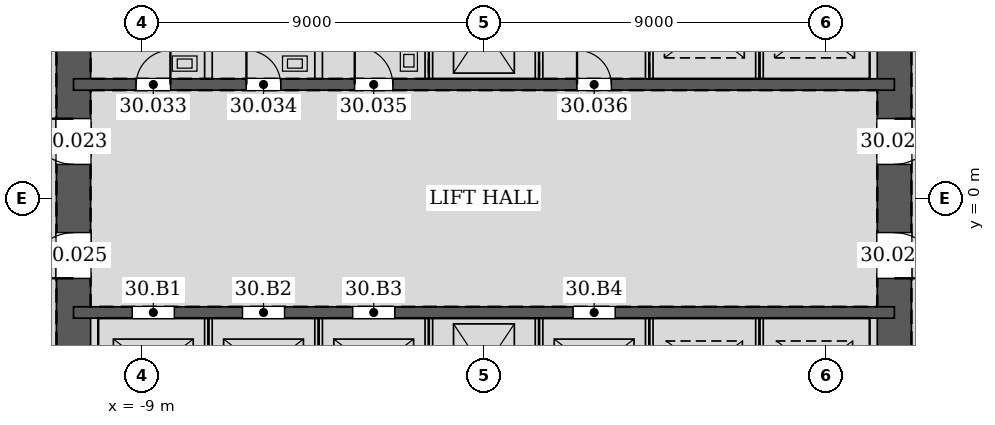
"""IFC4 building model, lengths in metres.
Left out: names, types, materials, properties, quantities, classifications, styles, units other than length and angle.
Written with IfcOpenShell. Run it as: python <this file> out.ifc"""

import sys

from ifc_helpers import new_model, si_unit, direction, frame, frame_2d, origin, place, context, subcontext, project, spatial, rectangle, extrude, element, fill, save


model = new_model("IFC4")
c1 = context("Model", 3, precision=1e-05, world=origin(), true_north=direction((0.0, 1.0)))
c2 = subcontext(c1, "Body", "Model", "MODEL_VIEW")
j1 = project(units=[si_unit("LENGTHUNIT", "METRE"), si_unit("PLANEANGLEUNIT", "RADIAN")], contexts=[c1])
p1 = place(None, origin())
s1 = spatial("IfcSite", under=j1, at=p1, CompositionType="ELEMENT")
p2 = place(p1, origin())
s2 = spatial("IfcBuilding", under=s1, at=p2, CompositionType="ELEMENT")
p3 = place(p2, frame((0.0, 0.0, 134.4)))
s3 = spatial("IfcBuildingStorey", under=s2, at=p3, CompositionType="ELEMENT", Elevation=134.4)
p4 = place(p3, frame((10.8, -10.8, 0.0), z_axis=(0.0, 0.0, 1.0), x_axis=(0.0, 1.0, 0.0)))
e1 = element("IfcWall", 1, at=p4, inside=s3, PredefinedType="SOLIDWALL", context=c2, shape_type="SweptSolid", body=[
    extrude(rectangle(XDim=21.6, YDim=0.9, at=frame_2d((10.8, 0.0))), origin(), (0.0, 0.0, 1.0), 4.2),
])
p5 = place(p4, frame((11.7, 0.0, 0.0)))
e2 = element("IfcOpeningElement", 2, at=p5, cuts=e1, PredefinedType="OPENING", context=c2, shape_type="SweptSolid", body=[
    extrude(rectangle(XDim=1.2, YDim=2.1, at=frame_2d((0.6, 1.05))), frame((0.0, 0.46, 0.0), z_axis=(0.0, -1.0, 0.0), x_axis=(1.0, 0.0, 0.0)), (0.0, 0.0, 1.0), 0.92),
])
p6 = place(p4, frame((8.7, 0.0, 0.0)))
e3 = element("IfcOpeningElement", 3, at=p6, cuts=e1, PredefinedType="OPENING", context=c2, shape_type="SweptSolid", body=[
    extrude(rectangle(XDim=1.2, YDim=2.1, at=frame_2d((0.6, 1.05))), frame((0.0, 0.46, 0.0), z_axis=(0.0, -1.0, 0.0), x_axis=(1.0, 0.0, 0.0)), (0.0, 0.0, 1.0), 0.92),
])
p7 = place(p3, frame((-10.8, 10.8, 0.0), z_axis=(0.0, 0.0, 1.0), x_axis=(0.0, -1.0, 0.0)))
e4 = element("IfcWall", 4, at=p7, inside=s3, PredefinedType="SOLIDWALL", context=c2, shape_type="SweptSolid", body=[
    extrude(rectangle(XDim=21.6, YDim=0.9, at=frame_2d((10.8, 0.0))), origin(), (0.0, 0.0, 1.0), 4.2),
])
p8 = place(p7, frame((8.7, 0.0, 0.0)))
e5 = element("IfcOpeningElement", 5, at=p8, cuts=e4, PredefinedType="OPENING", context=c2, shape_type="SweptSolid", body=[
    extrude(rectangle(XDim=1.2, YDim=2.1, at=frame_2d((0.6, 1.05))), frame((0.0, 0.46, 0.0), z_axis=(0.0, -1.0, 0.0), x_axis=(1.0, 0.0, 0.0)), (0.0, 0.0, 1.0), 0.92),
])
p9 = place(p7, frame((11.7, 0.0, 0.0)))
e6 = element("IfcOpeningElement", 6, at=p9, cuts=e4, PredefinedType="OPENING", context=c2, shape_type="SweptSolid", body=[
    extrude(rectangle(XDim=1.2, YDim=2.1, at=frame_2d((0.6, 1.05))), frame((0.0, 0.46, 0.0), z_axis=(0.0, -1.0, 0.0), x_axis=(1.0, 0.0, 0.0)), (0.0, 0.0, 1.0), 0.92),
])
p10 = place(p3, frame((-10.8, 3.0, 0.0), z_axis=(0.0, 0.0, 1.0), x_axis=(1.0, 0.0, 0.0)))
e7 = element("IfcWall", 7, at=p10, inside=s3, PredefinedType="SOLIDWALL", context=c2, shape_type="SweptSolid", body=[
    extrude(rectangle(XDim=21.6, YDim=0.3, at=frame_2d((10.8, 0.0))), origin(), (0.0, 0.0, 1.0), 4.2),
])
p11 = place(p10, frame((1.65, 0.0, 0.0)))
e8 = element("IfcOpeningElement", 8, at=p11, cuts=e7, PredefinedType="OPENING", context=c2, shape_type="SweptSolid", body=[
    extrude(rectangle(XDim=0.9, YDim=2.1, at=frame_2d((0.45, 1.05))), frame((0.0, 0.16, 0.0), z_axis=(0.0, -1.0, 0.0), x_axis=(1.0, 0.0, 0.0)), (0.0, 0.0, 1.0), 0.32),
])
p12 = place(p10, frame((4.55, 0.0, 0.0)))
e9 = element("IfcOpeningElement", 9, at=p12, cuts=e7, PredefinedType="OPENING", context=c2, shape_type="SweptSolid", body=[
    extrude(rectangle(XDim=0.9, YDim=2.1, at=frame_2d((0.45, 1.05))), frame((0.0, 0.16, 0.0), z_axis=(0.0, -1.0, 0.0), x_axis=(1.0, 0.0, 0.0)), (0.0, 0.0, 1.0), 0.32),
])
p13 = place(p10, frame((7.4, 0.0, 0.0)))
e10 = element("IfcOpeningElement", 10, at=p13, cuts=e7, PredefinedType="OPENING", context=c2, shape_type="SweptSolid", body=[
    extrude(rectangle(XDim=1.0, YDim=2.1, at=frame_2d((0.5, 1.05))), frame((0.0, 0.16, 0.0), z_axis=(0.0, -1.0, 0.0), x_axis=(1.0, 0.0, 0.0)), (0.0, 0.0, 1.0), 0.32),
])
p14 = place(p10, frame((13.25, 0.0, 0.0)))
e11 = element("IfcOpeningElement", 11, at=p14, cuts=e7, PredefinedType="OPENING", context=c2, shape_type="SweptSolid", body=[
    extrude(rectangle(XDim=0.9, YDim=2.1, at=frame_2d((0.45, 1.05))), frame((0.0, 0.16, 0.0), z_axis=(0.0, -1.0, 0.0), x_axis=(1.0, 0.0, 0.0)), (0.0, 0.0, 1.0), 0.32),
])
p15 = place(p3, frame((-10.8, -3.0, 0.0), z_axis=(0.0, 0.0, 1.0), x_axis=(1.0, 0.0, 0.0)))
e12 = element("IfcWall", 12, at=p15, inside=s3, PredefinedType="SOLIDWALL", context=c2, shape_type="SweptSolid", body=[
    extrude(rectangle(XDim=21.6, YDim=0.3, at=frame_2d((10.8, 0.0))), origin(), (0.0, 0.0, 1.0), 4.2),
])
p16 = place(p15, frame((1.55, 0.0, 0.0)))
e13 = element("IfcOpeningElement", 13, at=p16, cuts=e12, PredefinedType="OPENING", context=c2, shape_type="SweptSolid", body=[
    extrude(rectangle(XDim=1.1, YDim=2.1, at=frame_2d((0.55, 1.05))), frame((0.0, 0.16, 0.0), z_axis=(0.0, -1.0, 0.0), x_axis=(1.0, 0.0, 0.0)), (0.0, 0.0, 1.0), 0.32),
])
p17 = place(p15, frame((4.45, 0.0, 0.0)))
e14 = element("IfcOpeningElement", 14, at=p17, cuts=e12, PredefinedType="OPENING", context=c2, shape_type="SweptSolid", body=[
    extrude(rectangle(XDim=1.1, YDim=2.1, at=frame_2d((0.55, 1.05))), frame((0.0, 0.16, 0.0), z_axis=(0.0, -1.0, 0.0), x_axis=(1.0, 0.0, 0.0)), (0.0, 0.0, 1.0), 0.32),
])
p18 = place(p15, frame((7.35, 0.0, 0.0)))
e15 = element("IfcOpeningElement", 15, at=p18, cuts=e12, PredefinedType="OPENING", context=c2, shape_type="SweptSolid", body=[
    extrude(rectangle(XDim=1.1, YDim=2.1, at=frame_2d((0.55, 1.05))), frame((0.0, 0.16, 0.0), z_axis=(0.0, -1.0, 0.0), x_axis=(1.0, 0.0, 0.0)), (0.0, 0.0, 1.0), 0.32),
])
p19 = place(p15, frame((13.15, 0.0, 0.0)))
e16 = element("IfcOpeningElement", 16, at=p19, cuts=e12, PredefinedType="OPENING", context=c2, shape_type="SweptSolid", body=[
    extrude(rectangle(XDim=1.1, YDim=2.1, at=frame_2d((0.55, 1.05))), frame((0.0, 0.16, 0.0), z_axis=(0.0, -1.0, 0.0), x_axis=(1.0, 0.0, 0.0)), (0.0, 0.0, 1.0), 0.32),
])
for number, where, z_axis, x_axis in (
    (17, (-7.25, 3.15, 0.0), (0.0, 0.0, 1.0), (0.0, 1.0, 0.0)),
    (18, (-4.35, 3.15, 0.0), (0.0, 0.0, 1.0), (0.0, 1.0, 0.0)),
    (19, (-1.45, 3.15, 0.0), (0.0, 0.0, 1.0), (0.0, 1.0, 0.0)),
    (20, (1.45, 3.15, 0.0), (0.0, 0.0, 1.0), (0.0, 1.0, 0.0)),
    (21, (4.35, 3.15, 0.0), (0.0, 0.0, 1.0), (0.0, 1.0, 0.0)),
):
    element("IfcWall", number, at=place(p3, frame(where, z_axis=z_axis, x_axis=x_axis)), inside=s3, PredefinedType="PARTITIONING", context=c2, shape_type="SweptSolid", body=[
        extrude(rectangle(XDim=2.7, YDim=0.2, at=frame_2d((1.35, 0.0))), origin(), (0.0, 0.0, 1.0), 4.035),
    ])
for number, where, z_axis, x_axis in (
    (22, (7.25, 3.15, 0.0), (0.0, 0.0, 1.0), (0.0, 1.0, 0.0)),
    (23, (-7.25, -5.85, 0.0), (0.0, 0.0, 1.0), (0.0, 1.0, 0.0)),
    (24, (-4.35, -5.85, 0.0), (0.0, 0.0, 1.0), (0.0, 1.0, 0.0)),
    (25, (-1.45, -5.85, 0.0), (0.0, 0.0, 1.0), (0.0, 1.0, 0.0)),
    (26, (1.45, -5.85, 0.0), (0.0, 0.0, 1.0), (0.0, 1.0, 0.0)),
    (27, (4.35, -5.85, 0.0), (0.0, 0.0, 1.0), (0.0, 1.0, 0.0)),
    (28, (7.25, -5.85, 0.0), (0.0, 0.0, 1.0), (0.0, 1.0, 0.0)),
):
    element("IfcWall", number, at=place(p3, frame(where, z_axis=z_axis, x_axis=x_axis)), inside=s3, PredefinedType="PARTITIONING", context=c2, shape_type="SweptSolid", body=[
        extrude(rectangle(XDim=2.7, YDim=0.2, at=frame_2d((1.35, 0.0))), origin(), (0.0, 0.0, 1.0), 4.2),
    ])
p20 = place(p5, frame((1.2, 0.0, 0.0), z_axis=(0.0, 0.0, 1.0), x_axis=(-1.0, 0.0, 0.0)))
e29 = element("IfcDoor", 29, at=p20, inside=s3, OperationType="SINGLE_SWING_LEFT", PredefinedType="DOOR", context=c2, shape_type="SweptSolid", body=[
    extrude(rectangle(XDim=1.2, YDim=2.1, at=frame_2d((0.6, 1.05))), frame((0.0, 0.025, 0.0), z_axis=(0.0, -1.0, 0.0), x_axis=(1.0, 0.0, 0.0)), (0.0, 0.0, 1.0), 0.05),
])
fill(e2, e29)
p21 = place(p8, frame((1.2, 0.0, 0.0), z_axis=(0.0, 0.0, 1.0), x_axis=(-1.0, 0.0, 0.0)))
e30 = element("IfcDoor", 30, at=p21, inside=s3, OperationType="SINGLE_SWING_RIGHT", PredefinedType="DOOR", context=c2, shape_type="SweptSolid", body=[
    extrude(rectangle(XDim=1.2, YDim=2.1, at=frame_2d((0.6, 1.05))), frame((0.0, 0.025, 0.0), z_axis=(0.0, -1.0, 0.0), x_axis=(1.0, 0.0, 0.0)), (0.0, 0.0, 1.0), 0.05),
])
fill(e5, e30)
p22 = place(p6, frame((1.2, 0.0, 0.0), z_axis=(0.0, 0.0, 1.0), x_axis=(-1.0, 0.0, 0.0)))
e31 = element("IfcDoor", 31, at=p22, inside=s3, OperationType="SINGLE_SWING_RIGHT", PredefinedType="DOOR", context=c2, shape_type="SweptSolid", body=[
    extrude(rectangle(XDim=1.2, YDim=2.1, at=frame_2d((0.6, 1.05))), frame((0.0, 0.025, 0.0), z_axis=(0.0, -1.0, 0.0), x_axis=(1.0, 0.0, 0.0)), (0.0, 0.0, 1.0), 0.05),
])
fill(e3, e31)
p23 = place(p9, frame((1.2, 0.0, 0.0), z_axis=(0.0, 0.0, 1.0), x_axis=(-1.0, 0.0, 0.0)))
e32 = element("IfcDoor", 32, at=p23, inside=s3, OperationType="SINGLE_SWING_LEFT", PredefinedType="DOOR", context=c2, shape_type="SweptSolid", body=[
    extrude(rectangle(XDim=1.2, YDim=2.1, at=frame_2d((0.6, 1.05))), frame((0.0, 0.025, 0.0), z_axis=(0.0, -1.0, 0.0), x_axis=(1.0, 0.0, 0.0)), (0.0, 0.0, 1.0), 0.05),
])
fill(e6, e32)
p24 = place(p11, origin())
e33 = element("IfcDoor", 33, at=p24, inside=s3, OperationType="SINGLE_SWING_RIGHT", PredefinedType="DOOR", context=c2, shape_type="SweptSolid", body=[
    extrude(rectangle(XDim=0.9, YDim=2.1, at=frame_2d((0.45, 1.05))), frame((0.0, 0.025, 0.0), z_axis=(0.0, -1.0, 0.0), x_axis=(1.0, 0.0, 0.0)), (0.0, 0.0, 1.0), 0.05),
])
fill(e8, e33)
p25 = place(p12, origin())
e34 = element("IfcDoor", 34, at=p25, inside=s3, OperationType="SINGLE_SWING_LEFT", PredefinedType="DOOR", context=c2, shape_type="SweptSolid", body=[
    extrude(rectangle(XDim=0.9, YDim=2.1, at=frame_2d((0.45, 1.05))), frame((0.0, 0.025, 0.0), z_axis=(0.0, -1.0, 0.0), x_axis=(1.0, 0.0, 0.0)), (0.0, 0.0, 1.0), 0.05),
])
fill(e9, e34)
p26 = place(p13, origin())
e35 = element("IfcDoor", 35, at=p26, inside=s3, OperationType="SINGLE_SWING_LEFT", PredefinedType="DOOR", context=c2, shape_type="SweptSolid", body=[
    extrude(rectangle(XDim=1.0, YDim=2.1, at=frame_2d((0.5, 1.05))), frame((0.0, 0.025, 0.0), z_axis=(0.0, -1.0, 0.0), x_axis=(1.0, 0.0, 0.0)), (0.0, 0.0, 1.0), 0.05),
])
fill(e10, e35)
p27 = place(p14, origin())
e36 = element("IfcDoor", 36, at=p27, inside=s3, OperationType="SINGLE_SWING_LEFT", PredefinedType="DOOR", context=c2, shape_type="SweptSolid", body=[
    extrude(rectangle(XDim=0.9, YDim=2.1, at=frame_2d((0.45, 1.05))), frame((0.0, 0.025, 0.0), z_axis=(0.0, -1.0, 0.0), x_axis=(1.0, 0.0, 0.0)), (0.0, 0.0, 1.0), 0.05),
])
fill(e11, e36)
p28 = place(p16, origin())
e37 = element("IfcDoor", 37, at=p28, inside=s3, OperationType="DOUBLE_DOOR_SLIDING", PredefinedType="DOOR", context=c2, shape_type="SweptSolid", body=[
    extrude(rectangle(XDim=1.1, YDim=2.1, at=frame_2d((0.55, 1.05))), frame((0.0, 0.025, 0.0), z_axis=(0.0, -1.0, 0.0), x_axis=(1.0, 0.0, 0.0)), (0.0, 0.0, 1.0), 0.05),
])
fill(e13, e37)
p29 = place(p17, origin())
e38 = element("IfcDoor", 38, at=p29, inside=s3, OperationType="DOUBLE_DOOR_SLIDING", PredefinedType="DOOR", context=c2, shape_type="SweptSolid", body=[
    extrude(rectangle(XDim=1.1, YDim=2.1, at=frame_2d((0.55, 1.05))), frame((0.0, 0.025, 0.0), z_axis=(0.0, -1.0, 0.0), x_axis=(1.0, 0.0, 0.0)), (0.0, 0.0, 1.0), 0.05),
])
fill(e14, e38)
p30 = place(p18, origin())
e39 = element("IfcDoor", 39, at=p30, inside=s3, OperationType="DOUBLE_DOOR_SLIDING", PredefinedType="DOOR", context=c2, shape_type="SweptSolid", body=[
    extrude(rectangle(XDim=1.1, YDim=2.1, at=frame_2d((0.55, 1.05))), frame((0.0, 0.025, 0.0), z_axis=(0.0, -1.0, 0.0), x_axis=(1.0, 0.0, 0.0)), (0.0, 0.0, 1.0), 0.05),
])
fill(e15, e39)
p31 = place(p19, origin())
e40 = element("IfcDoor", 40, at=p31, inside=s3, OperationType="DOUBLE_DOOR_SLIDING", PredefinedType="DOOR", context=c2, shape_type="SweptSolid", body=[
    extrude(rectangle(XDim=1.1, YDim=2.1, at=frame_2d((0.55, 1.05))), frame((0.0, 0.025, 0.0), z_axis=(0.0, -1.0, 0.0), x_axis=(1.0, 0.0, 0.0)), (0.0, 0.0, 1.0), 0.05),
])
fill(e16, e40)
save(model, sys.argv[1])
